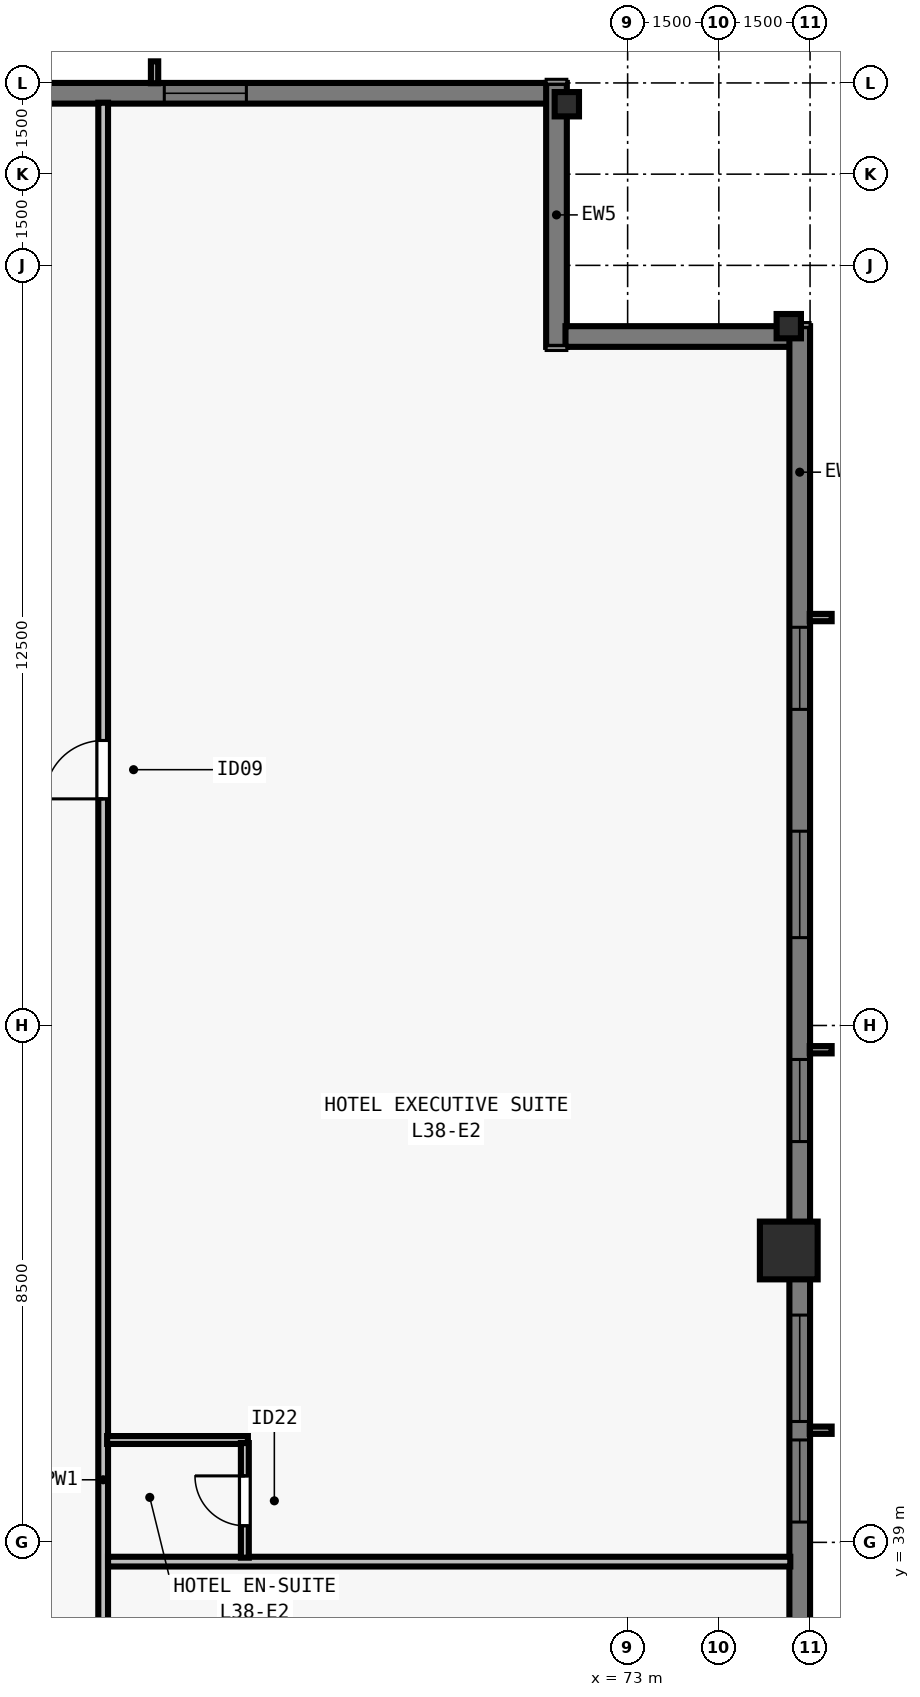
"""IFC4 building model, lengths in metres.
Left out: names, types, materials, properties, quantities, classifications, styles, units other than length and angle.
Written with IfcOpenShell. Run it as: python <this file> out.ifc"""

import sys

from ifc_helpers import new_model, si_unit, direction, frame, frame_2d, origin, origin_2d, place, context, subcontext, project, spatial, rectangle, i_section, extrude, element, fill, save


model = new_model("IFC4")
c1 = context("Model", 3, precision=1e-05, world=origin(), true_north=direction((0.0, 1.0)))
c2 = subcontext(c1, "Body", "Model", "MODEL_VIEW")
j1 = project(units=[si_unit("LENGTHUNIT", "METRE"), si_unit("PLANEANGLEUNIT", "RADIAN")], contexts=[c1])
p1 = place(None, origin())
s1 = spatial("IfcSite", under=j1, at=p1, CompositionType="ELEMENT")
p2 = place(p1, origin())
s2 = spatial("IfcBuilding", under=s1, at=p2, CompositionType="ELEMENT")
p3 = place(p2, frame((0.0, 0.0, 141.0)))
s3 = spatial("IfcBuildingStorey", under=s2, at=p3, CompositionType="ELEMENT", Elevation=141.0)
p4 = place(p3, frame((75.65, 43.8, 0.0), z_axis=(0.0, 0.0, 1.0), x_axis=(0.0, 1.0, 0.0)))
e1 = element("IfcColumn", 1, at=p4, inside=s3, PredefinedType="COLUMN", context=c2, shape_type="SweptSolid", body=[
    extrude(rectangle(XDim=0.95, YDim=0.95, at=origin_2d()), origin(), (0.0, 0.0, 1.0), 3.5),
])
for number, where, z_axis, x_axis in (
    (2, (75.65, 59.0, 0.0), (0.0, 0.0, 1.0), (0.0, 1.0, 0.0)),
    (3, (72.0, 62.65, 0.0), (0.0, 0.0, 1.0), (1.0, 0.0, 0.0)),
):
    element("IfcColumn", number, at=place(p3, frame(where, z_axis=z_axis, x_axis=x_axis)), inside=s3, PredefinedType="COLUMN", context=c2, shape_type="SweptSolid", body=[
        extrude(i_section(OverallWidth=0.4, OverallDepth=0.4, WebThickness=0.022, FlangeThickness=0.036, at=origin_2d()), origin(), (0.0, 0.0, 1.0), 3.5),
    ])
p5 = place(p3, frame((32.0, 62.83, 0.0), z_axis=(0.0, 0.0, 1.0), x_axis=(1.0, 0.0, 0.0)))
e4 = element("IfcWall", 4, at=p5, inside=s3, PredefinedType="SOLIDWALL", context=c2, shape_type="SweptSolid", body=[
    extrude(rectangle(XDim=39.682, YDim=0.34, at=frame_2d((19.841, 0.0))), origin(), (0.0, 0.0, 1.0), 3.28),
])
p6 = place(p5, frame((4.102, 0.0, 0.8)))
e5 = element("IfcOpeningElement", 5, at=p6, cuts=e4, PredefinedType="OPENING", context=c2, shape_type="SweptSolid", body=[
    extrude(rectangle(XDim=1.35, YDim=1.66, at=frame_2d((0.675, 0.83))), frame((0.0, 0.18, 0.0), z_axis=(0.0, -1.0, 0.0), x_axis=(1.0, 0.0, 0.0)), (0.0, 0.0, 1.0), 0.36),
])
p7 = place(p5, frame((8.755, 0.0, 0.8)))
e6 = element("IfcOpeningElement", 6, at=p7, cuts=e4, PredefinedType="OPENING", context=c2, shape_type="SweptSolid", body=[
    extrude(rectangle(XDim=1.75, YDim=1.66, at=frame_2d((0.875, 0.83))), frame((0.0, 0.18, 0.0), z_axis=(0.0, -1.0, 0.0), x_axis=(1.0, 0.0, 0.0)), (0.0, 0.0, 1.0), 0.36),
])
p8 = place(p5, frame((12.059, 0.0, 0.8)))
e7 = element("IfcOpeningElement", 7, at=p8, cuts=e4, PredefinedType="OPENING", context=c2, shape_type="SweptSolid", body=[
    extrude(rectangle(XDim=1.35, YDim=1.66, at=frame_2d((0.675, 0.83))), frame((0.0, 0.18, 0.0), z_axis=(0.0, -1.0, 0.0), x_axis=(1.0, 0.0, 0.0)), (0.0, 0.0, 1.0), 0.36),
])
p9 = place(p5, frame((16.262, 0.0, 0.8)))
e8 = element("IfcOpeningElement", 8, at=p9, cuts=e4, PredefinedType="OPENING", context=c2, shape_type="SweptSolid", body=[
    extrude(rectangle(XDim=1.75, YDim=1.66, at=frame_2d((0.875, 0.83))), frame((0.0, 0.18, 0.0), z_axis=(0.0, -1.0, 0.0), x_axis=(1.0, 0.0, 0.0)), (0.0, 0.0, 1.0), 0.36),
])
p10 = place(p5, frame((18.316, 0.0, 0.8)))
e9 = element("IfcOpeningElement", 9, at=p10, cuts=e4, PredefinedType="OPENING", context=c2, shape_type="SweptSolid", body=[
    extrude(rectangle(XDim=1.35, YDim=1.66, at=frame_2d((0.675, 0.83))), frame((0.0, 0.18, 0.0), z_axis=(0.0, -1.0, 0.0), x_axis=(1.0, 0.0, 0.0)), (0.0, 0.0, 1.0), 0.36),
])
p11 = place(p5, frame((22.07, 0.0, 0.8)))
e10 = element("IfcOpeningElement", 10, at=p11, cuts=e4, PredefinedType="OPENING", context=c2, shape_type="SweptSolid", body=[
    extrude(rectangle(XDim=1.75, YDim=1.66, at=frame_2d((0.875, 0.83))), frame((0.0, 0.18, 0.0), z_axis=(0.0, -1.0, 0.0), x_axis=(1.0, 0.0, 0.0)), (0.0, 0.0, 1.0), 0.36),
])
p12 = place(p5, frame((26.273, 0.0, 0.8)))
e11 = element("IfcOpeningElement", 11, at=p12, cuts=e4, PredefinedType="OPENING", context=c2, shape_type="SweptSolid", body=[
    extrude(rectangle(XDim=1.35, YDim=1.66, at=frame_2d((0.675, 0.83))), frame((0.0, 0.18, 0.0), z_axis=(0.0, -1.0, 0.0), x_axis=(1.0, 0.0, 0.0)), (0.0, 0.0, 1.0), 0.36),
])
p13 = place(p5, frame((33.38, 0.0, 0.8)))
e12 = element("IfcOpeningElement", 12, at=p13, cuts=e4, PredefinedType="OPENING", context=c2, shape_type="SweptSolid", body=[
    extrude(rectangle(XDim=1.35, YDim=1.66, at=frame_2d((0.675, 0.83))), frame((0.0, 0.18, 0.0), z_axis=(0.0, -1.0, 0.0), x_axis=(1.0, 0.0, 0.0)), (0.0, 0.0, 1.0), 0.36),
])
p14 = place(p3, frame((71.83, 63.0, 0.0), z_axis=(0.0, 0.0, 1.0), x_axis=(0.0, -1.0, 0.0)))
e13 = element("IfcWall", 13, at=p14, inside=s3, PredefinedType="SOLIDWALL", context=c2, shape_type="SweptSolid", body=[
    extrude(rectangle(XDim=4.34, YDim=0.34, at=frame_2d((2.17, 0.0))), origin(), (0.0, 0.0, 1.0), 3.28),
])
p15 = place(p3, frame((71.978, 58.83, 0.0), z_axis=(0.0, 0.0, 1.0), x_axis=(1.0, 0.0, 0.0)))
e14 = element("IfcWall", 14, at=p15, inside=s3, PredefinedType="SOLIDWALL", context=c2, shape_type="SweptSolid", body=[
    extrude(rectangle(XDim=3.704, YDim=0.34, at=frame_2d((1.852, 0.0))), origin(), (0.0, 0.0, 1.0), 3.28),
])
p16 = place(p3, frame((75.83, 59.0, 0.0), z_axis=(0.0, 0.0, 1.0), x_axis=(0.0, -1.0, 0.0)))
e15 = element("IfcWall", 15, at=p16, inside=s3, PredefinedType="SOLIDWALL", context=c2, shape_type="SweptSolid", body=[
    extrude(rectangle(XDim=39.682, YDim=0.34, at=frame_2d((19.841, 0.0))), origin(), (0.0, 0.0, 1.0), 3.28),
])
p17 = place(p16, frame((4.952, 0.0, 0.8)))
e16 = element("IfcOpeningElement", 16, at=p17, cuts=e15, PredefinedType="OPENING", context=c2, shape_type="SweptSolid", body=[
    extrude(rectangle(XDim=1.35, YDim=1.66, at=frame_2d((0.675, 0.83))), frame((0.0, 0.18, 0.0), z_axis=(0.0, -1.0, 0.0), x_axis=(1.0, 0.0, 0.0)), (0.0, 0.0, 1.0), 0.36),
])
p18 = place(p16, frame((8.305, 0.0, 0.8)))
e17 = element("IfcOpeningElement", 17, at=p18, cuts=e15, PredefinedType="OPENING", context=c2, shape_type="SweptSolid", body=[
    extrude(rectangle(XDim=1.75, YDim=1.66, at=frame_2d((0.875, 0.83))), frame((0.0, 0.18, 0.0), z_axis=(0.0, -1.0, 0.0), x_axis=(1.0, 0.0, 0.0)), (0.0, 0.0, 1.0), 0.36),
])
p19 = place(p16, frame((12.059, 0.0, 0.8)))
e18 = element("IfcOpeningElement", 18, at=p19, cuts=e15, PredefinedType="OPENING", context=c2, shape_type="SweptSolid", body=[
    extrude(rectangle(XDim=1.35, YDim=1.66, at=frame_2d((0.675, 0.83))), frame((0.0, 0.18, 0.0), z_axis=(0.0, -1.0, 0.0), x_axis=(1.0, 0.0, 0.0)), (0.0, 0.0, 1.0), 0.36),
])
p20 = place(p16, frame((16.262, 0.0, 0.8)))
e19 = element("IfcOpeningElement", 19, at=p20, cuts=e15, PredefinedType="OPENING", context=c2, shape_type="SweptSolid", body=[
    extrude(rectangle(XDim=1.75, YDim=1.66, at=frame_2d((0.875, 0.83))), frame((0.0, 0.18, 0.0), z_axis=(0.0, -1.0, 0.0), x_axis=(1.0, 0.0, 0.0)), (0.0, 0.0, 1.0), 0.36),
])
p21 = place(p16, frame((18.316, 0.0, 0.8)))
e20 = element("IfcOpeningElement", 20, at=p21, cuts=e15, PredefinedType="OPENING", context=c2, shape_type="SweptSolid", body=[
    extrude(rectangle(XDim=1.35, YDim=1.66, at=frame_2d((0.675, 0.83))), frame((0.0, 0.18, 0.0), z_axis=(0.0, -1.0, 0.0), x_axis=(1.0, 0.0, 0.0)), (0.0, 0.0, 1.0), 0.36),
])
p22 = place(p16, frame((22.07, 0.0, 0.8)))
e21 = element("IfcOpeningElement", 21, at=p22, cuts=e15, PredefinedType="OPENING", context=c2, shape_type="SweptSolid", body=[
    extrude(rectangle(XDim=1.75, YDim=1.66, at=frame_2d((0.875, 0.83))), frame((0.0, 0.18, 0.0), z_axis=(0.0, -1.0, 0.0), x_axis=(1.0, 0.0, 0.0)), (0.0, 0.0, 1.0), 0.36),
])
p23 = place(p16, frame((26.273, 0.0, 0.8)))
e22 = element("IfcOpeningElement", 22, at=p23, cuts=e15, PredefinedType="OPENING", context=c2, shape_type="SweptSolid", body=[
    extrude(rectangle(XDim=1.35, YDim=1.66, at=frame_2d((0.675, 0.83))), frame((0.0, 0.18, 0.0), z_axis=(0.0, -1.0, 0.0), x_axis=(1.0, 0.0, 0.0)), (0.0, 0.0, 1.0), 0.36),
])
p24 = place(p16, frame((29.627, 0.0, 0.8)))
e23 = element("IfcOpeningElement", 23, at=p24, cuts=e15, PredefinedType="OPENING", context=c2, shape_type="SweptSolid", body=[
    extrude(rectangle(XDim=1.75, YDim=1.66, at=frame_2d((0.875, 0.83))), frame((0.0, 0.18, 0.0), z_axis=(0.0, -1.0, 0.0), x_axis=(1.0, 0.0, 0.0)), (0.0, 0.0, 1.0), 0.36),
])
p25 = place(p16, frame((33.38, 0.0, 0.8)))
e24 = element("IfcOpeningElement", 24, at=p25, cuts=e15, PredefinedType="OPENING", context=c2, shape_type="SweptSolid", body=[
    extrude(rectangle(XDim=1.35, YDim=1.66, at=frame_2d((0.675, 0.83))), frame((0.0, 0.18, 0.0), z_axis=(0.0, -1.0, 0.0), x_axis=(1.0, 0.0, 0.0)), (0.0, 0.0, 1.0), 0.36),
])
p26 = place(p3, frame((64.375, 15.325, 0.0), z_axis=(0.0, 0.0, 1.0), x_axis=(0.0, 1.0, 0.0)))
e25 = element("IfcWall", 25, at=p26, inside=s3, PredefinedType="PARTITIONING", context=c2, shape_type="SweptSolid", body=[
    extrude(rectangle(XDim=47.35, YDim=0.16, at=frame_2d((23.675, 0.0))), origin(), (0.0, 0.0, 1.0), 2.555),
])
p27 = place(p26, frame((12.547, 0.0, 0.0)))
e26 = element("IfcOpeningElement", 26, at=p27, cuts=e25, PredefinedType="OPENING", context=c2, shape_type="SweptSolid", body=[
    extrude(rectangle(XDim=0.96, YDim=2.15, at=frame_2d((0.48, 1.075))), frame((0.0, 0.09, 0.0), z_axis=(0.0, -1.0, 0.0), x_axis=(1.0, 0.0, 0.0)), (0.0, 0.0, 1.0), 0.18),
])
p28 = place(p26, frame((35.902, 0.0, 0.0)))
e27 = element("IfcOpeningElement", 27, at=p28, cuts=e25, PredefinedType="OPENING", context=c2, shape_type="SweptSolid", body=[
    extrude(rectangle(XDim=0.96, YDim=2.15, at=frame_2d((0.48, 1.075))), frame((0.0, 0.09, 0.0), z_axis=(0.0, -1.0, 0.0), x_axis=(1.0, 0.0, 0.0)), (0.0, 0.0, 1.0), 0.18),
])
p29 = place(p3, frame((64.455, 38.683, 0.0), z_axis=(0.0, 0.0, 1.0), x_axis=(1.0, 0.0, 0.0)))
e28 = element("IfcWall", 28, at=p29, inside=s3, PredefinedType="PARTITIONING", context=c2, shape_type="SweptSolid", body=[
    extrude(rectangle(XDim=11.22, YDim=0.16, at=frame_2d((5.61, 0.0))), origin(), (0.0, 0.0, 1.0), 3.28),
])
p30 = place(p3, frame((64.44, 40.683, 0.0), z_axis=(0.0, 0.0, 1.0), x_axis=(1.0, 0.0, 0.0)))
e29 = element("IfcWall", 29, at=p30, inside=s3, PredefinedType="PLUMBINGWALL", context=c2, shape_type="SweptSolid", body=[
    extrude(rectangle(XDim=2.315, YDim=0.13, at=frame_2d((1.157, 0.0))), origin(), (0.0, 0.0, 1.0), 3.28),
])
p31 = place(p3, frame((66.705, 38.748, 0.0), z_axis=(0.0, 0.0, 1.0), x_axis=(0.0, 1.0, 0.0)))
e30 = element("IfcWall", 30, at=p31, inside=s3, PredefinedType="PLUMBINGWALL", context=c2, shape_type="SweptSolid", body=[
    extrude(rectangle(XDim=1.885, YDim=0.13, at=frame_2d((0.942, 0.0))), origin(), (0.0, 0.0, 1.0), 3.28),
])
p32 = place(p31, frame((0.525, 0.0, 0.0)))
e31 = element("IfcOpeningElement", 31, at=p32, cuts=e30, PredefinedType="OPENING", context=c2, shape_type="SweptSolid", body=[
    extrude(rectangle(XDim=0.82, YDim=2.1, at=frame_2d((0.41, 1.05))), frame((0.0, 0.075, 0.0), z_axis=(0.0, -1.0, 0.0), x_axis=(1.0, 0.0, 0.0)), (0.0, 0.0, 1.0), 0.15),
])
p33 = place(p13, origin())
e32 = element("IfcWindow", 32, at=p33, inside=s3, PartitioningType="SINGLE_PANEL", PredefinedType="WINDOW", context=c2, shape_type="SweptSolid", body=[
    extrude(rectangle(XDim=1.35, YDim=1.66, at=frame_2d((0.675, 0.83))), frame((0.0, -0.05, 0.0), z_axis=(0.0, -1.0, 0.0), x_axis=(1.0, 0.0, 0.0)), (0.0, 0.0, 1.0), 0.06),
])
fill(e12, e32)
p34 = place(p17, origin())
e33 = element("IfcWindow", 33, at=p34, inside=s3, PartitioningType="SINGLE_PANEL", PredefinedType="WINDOW", context=c2, shape_type="SweptSolid", body=[
    extrude(rectangle(XDim=1.35, YDim=1.66, at=frame_2d((0.675, 0.83))), frame((0.0, -0.05, 0.0), z_axis=(0.0, -1.0, 0.0), x_axis=(1.0, 0.0, 0.0)), (0.0, 0.0, 1.0), 0.06),
])
fill(e16, e33)
p35 = place(p18, origin())
e34 = element("IfcWindow", 34, at=p35, inside=s3, PartitioningType="SINGLE_PANEL", PredefinedType="WINDOW", context=c2, shape_type="SweptSolid", body=[
    extrude(rectangle(XDim=1.75, YDim=1.66, at=frame_2d((0.875, 0.83))), frame((0.0, -0.05, 0.0), z_axis=(0.0, -1.0, 0.0), x_axis=(1.0, 0.0, 0.0)), (0.0, 0.0, 1.0), 0.06),
])
fill(e17, e34)
p36 = place(p19, origin())
e35 = element("IfcWindow", 35, at=p36, inside=s3, PartitioningType="SINGLE_PANEL", PredefinedType="WINDOW", context=c2, shape_type="SweptSolid", body=[
    extrude(rectangle(XDim=1.35, YDim=1.66, at=frame_2d((0.675, 0.83))), frame((0.0, -0.05, 0.0), z_axis=(0.0, -1.0, 0.0), x_axis=(1.0, 0.0, 0.0)), (0.0, 0.0, 1.0), 0.06),
])
fill(e18, e35)
p37 = place(p20, origin())
e36 = element("IfcWindow", 36, at=p37, inside=s3, PartitioningType="SINGLE_PANEL", PredefinedType="WINDOW", context=c2, shape_type="SweptSolid", body=[
    extrude(rectangle(XDim=1.75, YDim=1.66, at=frame_2d((0.875, 0.83))), frame((0.0, -0.05, 0.0), z_axis=(0.0, -1.0, 0.0), x_axis=(1.0, 0.0, 0.0)), (0.0, 0.0, 1.0), 0.06),
])
fill(e19, e36)
p38 = place(p21, origin())
e37 = element("IfcWindow", 37, at=p38, inside=s3, PartitioningType="SINGLE_PANEL", PredefinedType="WINDOW", context=c2, shape_type="SweptSolid", body=[
    extrude(rectangle(XDim=1.35, YDim=1.66, at=frame_2d((0.675, 0.83))), frame((0.0, -0.05, 0.0), z_axis=(0.0, -1.0, 0.0), x_axis=(1.0, 0.0, 0.0)), (0.0, 0.0, 1.0), 0.06),
])
fill(e20, e37)
p39 = place(p32, origin())
e38 = element("IfcDoor", 38, at=p39, inside=s3, OperationType="SINGLE_SWING_RIGHT", PredefinedType="DOOR", context=c2, shape_type="SweptSolid", body=[
    extrude(rectangle(XDim=0.82, YDim=2.1, at=frame_2d((0.41, 1.05))), frame((0.0, 0.025, 0.0), z_axis=(0.0, -1.0, 0.0), x_axis=(1.0, 0.0, 0.0)), (0.0, 0.0, 1.0), 0.05),
])
fill(e31, e38)
p40 = place(p28, origin())
e39 = element("IfcDoor", 39, at=p40, inside=s3, OperationType="SINGLE_SWING_LEFT", PredefinedType="DOOR", context=c2, shape_type="SweptSolid", body=[
    extrude(rectangle(XDim=0.96, YDim=2.15, at=frame_2d((0.48, 1.075))), frame((0.0, 0.025, 0.0), z_axis=(0.0, -1.0, 0.0), x_axis=(1.0, 0.0, 0.0)), (0.0, 0.0, 1.0), 0.05),
])
fill(e27, e39)
save(model, sys.argv[1])
